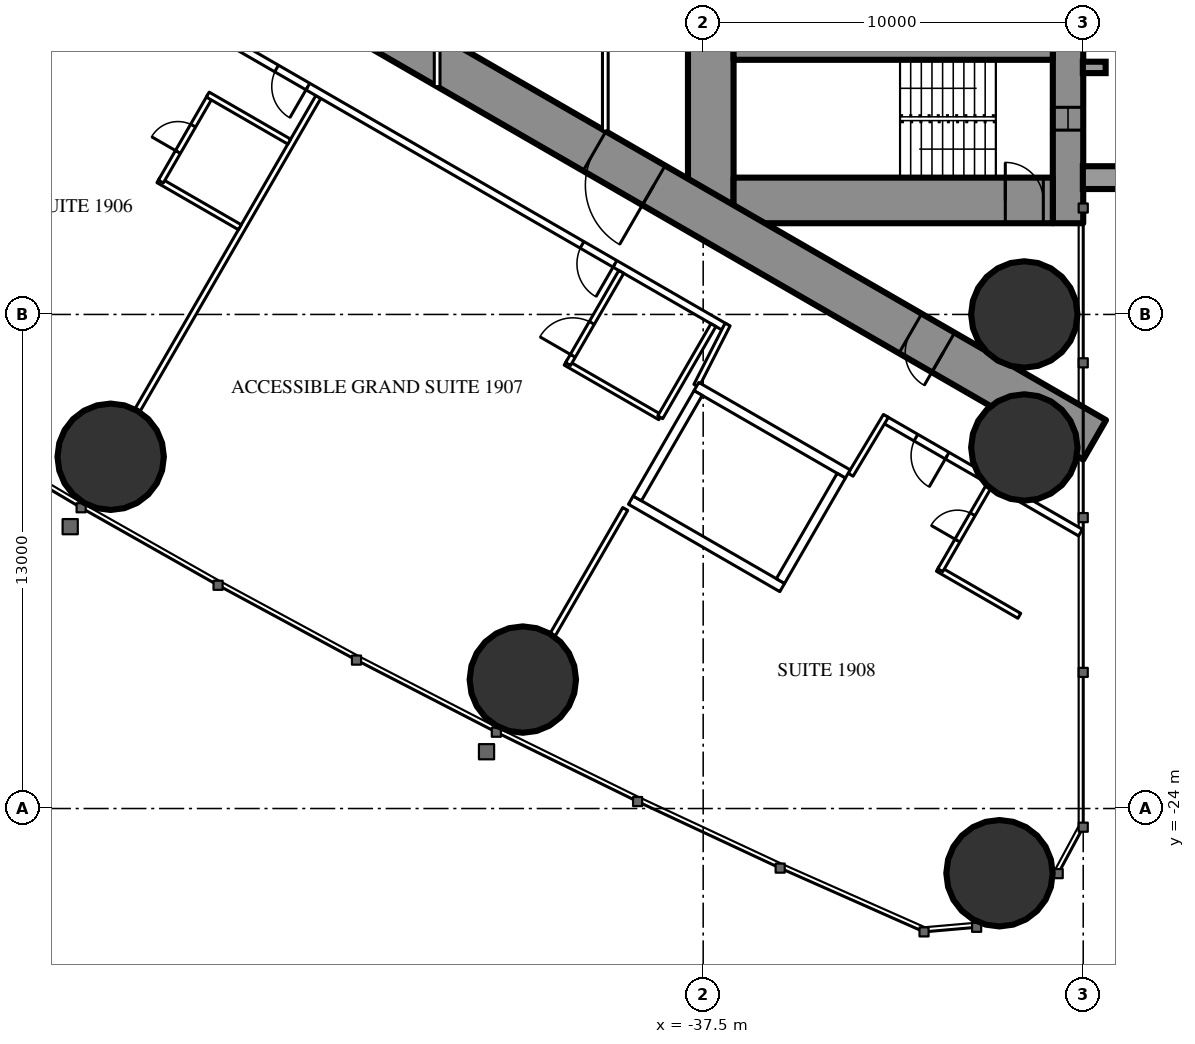
"""IFC4 building model, lengths in metres.
Left out: names, types, materials, properties, quantities, classifications, styles, units other than length and angle.
Written with IfcOpenShell. Run it as: python <this file> out.ifc"""

import sys

from ifc_helpers import new_model, si_unit, direction, frame, frame_2d, origin, origin_2d, place, context, subcontext, project, spatial, rectangle, hollow_circle, extrude, element, fill, save


model = new_model("IFC4")
c1 = context("Model", 3, precision=1e-05, world=origin(), true_north=direction((0.0, 1.0)))
c2 = subcontext(c1, "Body", "Model", "MODEL_VIEW")
j1 = project(units=[si_unit("LENGTHUNIT", "METRE"), si_unit("PLANEANGLEUNIT", "RADIAN")], contexts=[c1])
p1 = place(None, origin())
s1 = spatial("IfcSite", under=j1, at=p1, CompositionType="ELEMENT")
p2 = place(p1, origin())
s2 = spatial("IfcBuilding", under=s1, at=p2, CompositionType="ELEMENT")
p3 = place(p2, frame((0.0, 0.0, 74.0)))
s3 = spatial("IfcBuildingStorey", under=s2, at=p3, CompositionType="ELEMENT", Elevation=74.0)
for number, where, z_axis, x_axis in (
    (1, (-29.703, -25.703, 0.0), (0.0, 0.0, 1.0), (1.0, 0.0, 0.0)),
    (2, (-29.05, -11.0, 0.0), (0.0, 0.0, 1.0), (1.0, 0.0, 0.0)),
    (3, (-29.05, -14.5, 0.0), (0.0, 0.0, 1.0), (1.0, 0.0, 0.0)),
    (4, (-53.09, -14.745, 0.0), (0.0, 0.0, 1.0), (1.0, 0.0, 0.0)),
    (5, (-42.245, -20.607, 0.0), (0.0, 0.0, 1.0), (1.0, 0.0, 0.0)),
):
    element("IfcColumn", number, at=place(p3, frame(where, z_axis=z_axis, x_axis=x_axis)), inside=s3, PredefinedType="COLUMN", context=c2, shape_type="SweptSolid", body=[
        extrude(hollow_circle(Radius=1.4, WallThickness=0.12, at=origin_2d()), origin(), (0.0, 0.0, 1.0), 3.5),
    ])
p4 = place(p3, frame((-27.9, 8.6, 0.0), z_axis=(0.0, 0.0, 1.0), x_axis=(0.0, -1.0, 0.0)))
e6 = element("IfcWall", 6, at=p4, inside=s3, PredefinedType="SHEAR", context=c2, shape_type="SweptSolid", body=[
    extrude(rectangle(XDim=17.2, YDim=0.8, at=frame_2d((8.6, 0.0))), origin(), (0.0, 0.0, 1.0), 3.5),
])
p5 = place(p4, frame((2.45, 0.0, 0.6)))
e7 = element("IfcOpeningElement", 7, at=p5, cuts=e6, PredefinedType="OPENING", context=c2, shape_type="SweptSolid", body=[
    extrude(rectangle(XDim=0.6, YDim=2.1, at=frame_2d((0.3, 1.05))), frame((0.0, 0.41, 0.0), z_axis=(0.0, -1.0, 0.0), x_axis=(1.0, 0.0, 0.0)), (0.0, 0.0, 1.0), 0.82),
])
p6 = place(p4, frame((14.15, 0.0, 0.6)))
e8 = element("IfcOpeningElement", 8, at=p6, cuts=e6, PredefinedType="OPENING", context=c2, shape_type="SweptSolid", body=[
    extrude(rectangle(XDim=0.6, YDim=2.1, at=frame_2d((0.3, 1.05))), frame((0.0, 0.41, 0.0), z_axis=(0.0, -1.0, 0.0), x_axis=(1.0, 0.0, 0.0)), (0.0, 0.0, 1.0), 0.82),
])
p7 = place(p3, frame((-37.3, 8.6, 0.0), z_axis=(0.0, 0.0, 1.0), x_axis=(0.0, -1.0, 0.0)))
e9 = element("IfcWall", 9, at=p7, inside=s3, PredefinedType="SHEAR", context=c2, shape_type="SweptSolid", body=[
    extrude(rectangle(XDim=17.2, YDim=1.2, at=frame_2d((8.6, 0.0))), origin(), (0.0, 0.0, 1.0), 3.5),
])
p8 = place(p7, frame((7.7, 0.0, 0.0)))
e10 = element("IfcOpeningElement", 10, at=p8, cuts=e9, PredefinedType="OPENING", context=c2, shape_type="SweptSolid", body=[
    extrude(rectangle(XDim=1.8, YDim=2.2, at=frame_2d((0.9, 1.1))), frame((0.0, 0.61, 0.0), z_axis=(0.0, -1.0, 0.0), x_axis=(1.0, 0.0, 0.0)), (0.0, 0.0, 1.0), 1.22),
])
p9 = place(p3, frame((-28.3, -8.0, 0.0), z_axis=(0.0, 0.0, 1.0), x_axis=(-1.0, 0.0, 0.0)))
e11 = element("IfcWall", 11, at=p9, inside=s3, PredefinedType="SHEAR", context=c2, shape_type="SweptSolid", body=[
    extrude(rectangle(XDim=8.4, YDim=1.2, at=frame_2d((4.2, 0.0))), origin(), (0.0, 0.0, 1.0), 3.5),
])
p10 = place(p9, frame((0.25, 0.0, 0.0)))
e12 = element("IfcOpeningElement", 12, at=p10, cuts=e11, PredefinedType="OPENING", context=c2, shape_type="SweptSolid", body=[
    extrude(rectangle(XDim=1.0, YDim=2.2, at=frame_2d((0.5, 1.1))), frame((0.0, 0.61, 0.0), z_axis=(0.0, -1.0, 0.0), x_axis=(1.0, 0.0, 0.0)), (0.0, 0.0, 1.0), 1.22),
])
p11 = place(p3, frame((-28.3, -4.15, 0.0), z_axis=(0.0, 0.0, 1.0), x_axis=(-1.0, 0.0, 0.0)))
e13 = element("IfcWall", 13, at=p11, inside=s3, PredefinedType="SHEAR", context=c2, shape_type="SweptSolid", body=[
    extrude(rectangle(XDim=8.4, YDim=0.3, at=frame_2d((4.2, 0.0))), origin(), (0.0, 0.0, 1.0), 3.5),
])
p12 = place(p3, frame((-27.2, -14.3, 0.0), z_axis=(0.0, 0.0, 1.0), x_axis=(-0.866024021859, 0.500002393557, 0.0)))
e14 = element("IfcWall", 14, at=p12, inside=s3, PredefinedType="SHEAR", context=c2, shape_type="SweptSolid", body=[
    extrude(rectangle(XDim=27.907, YDim=1.2, at=frame_2d((13.954, 0.0))), origin(), (0.0, 0.0, 1.0), 3.5),
])
p13 = place(p12, frame((4.6, 0.0, 0.0)))
e15 = element("IfcOpeningElement", 15, at=p13, cuts=e14, PredefinedType="OPENING", context=c2, shape_type="SweptSolid", body=[
    extrude(rectangle(XDim=1.0, YDim=2.2, at=frame_2d((0.5, 1.1))), frame((0.0, 0.61, 0.0), z_axis=(0.0, -1.0, 0.0), x_axis=(1.0, 0.0, 0.0)), (0.0, 0.0, 1.0), 1.22),
])
p14 = place(p12, frame((13.395, 0.0, 0.0)))
e16 = element("IfcOpeningElement", 16, at=p14, cuts=e14, PredefinedType="OPENING", context=c2, shape_type="SweptSolid", body=[
    extrude(rectangle(XDim=1.8, YDim=2.2, at=frame_2d((0.9, 1.1))), frame((0.0, 0.61, 0.0), z_axis=(0.0, -1.0, 0.0), x_axis=(1.0, 0.0, 0.0)), (0.0, 0.0, 1.0), 1.22),
])
p15 = place(p3, frame((-47.627, -5.278, 0.0), z_axis=(0.0, 0.0, 1.0), x_axis=(-0.500009844318, -0.86601972009, 0.0)))
e17 = element("IfcWall", 17, at=p15, inside=s3, PredefinedType="PARTITIONING", context=c2, shape_type="SweptSolid", body=[
    extrude(rectangle(XDim=9.51, YDim=0.15, at=frame_2d((4.755, 0.0))), origin(), (0.0, 0.0, 1.0), 2.25),
])
p16 = place(p3, frame((-39.551, -16.118, 0.0), z_axis=(0.0, 0.0, 1.0), x_axis=(-0.499986503906, -0.866033195618, 0.0)))
e18 = element("IfcWall", 18, at=p16, inside=s3, PredefinedType="PARTITIONING", context=c2, shape_type="SweptSolid", body=[
    extrude(rectangle(XDim=3.815, YDim=0.15, at=frame_2d((1.907, 0.0))), origin(), (0.0, 0.0, 1.0), 3.25),
])
p17 = place(p3, frame((-27.572, -16.741, 0.0), z_axis=(0.0, 0.0, 1.0), x_axis=(-0.866024464444, 0.500001626982, 0.0)))
e19 = element("IfcWall", 19, at=p17, inside=s3, PredefinedType="PARTITIONING", context=c2, shape_type="SweptSolid", body=[
    extrude(rectangle(XDim=5.955, YDim=0.2, at=frame_2d((2.978, 0.0))), origin(), (0.0, 0.0, 1.0), 3.25),
])
p18 = place(p17, frame((4.05, 0.0, 0.0)))
e20 = element("IfcOpeningElement", 20, at=p18, cuts=e19, PredefinedType="OPENING", context=c2, shape_type="SweptSolid", body=[
    extrude(rectangle(XDim=0.95, YDim=2.2, at=frame_2d((0.475, 1.1))), frame((0.0, 0.11, 0.0), z_axis=(0.0, -1.0, 0.0), x_axis=(1.0, 0.0, 0.0)), (0.0, 0.0, 1.0), 0.22),
])
p19 = place(p3, frame((-36.92, -11.344, 0.0), z_axis=(0.0, 0.0, 1.0), x_axis=(-0.866028313256, 0.499994960614, 0.0)))
e21 = element("IfcWall", 21, at=p19, inside=s3, PredefinedType="PARTITIONING", context=c2, shape_type="SweptSolid", body=[
    extrude(rectangle(XDim=22.568, YDim=0.2, at=frame_2d((11.284, 0.0))), origin(), (0.0, 0.0, 1.0), 3.25),
])
p20 = place(p19, frame((20.958, 0.0, 0.0)))
e22 = element("IfcOpeningElement", 22, at=p20, cuts=e21, PredefinedType="OPENING", context=c2, shape_type="SweptSolid", body=[
    extrude(rectangle(XDim=0.95, YDim=2.2, at=frame_2d((0.475, 1.1))), frame((0.0, 0.11, 0.0), z_axis=(0.0, -1.0, 0.0), x_axis=(1.0, 0.0, 0.0)), (0.0, 0.0, 1.0), 0.22),
])
p21 = place(p19, frame((12.68, 0.0, 0.0)))
e23 = element("IfcOpeningElement", 23, at=p21, cuts=e21, PredefinedType="OPENING", context=c2, shape_type="SweptSolid", body=[
    extrude(rectangle(XDim=0.95, YDim=2.2, at=frame_2d((0.475, 1.1))), frame((0.0, 0.11, 0.0), z_axis=(0.0, -1.0, 0.0), x_axis=(1.0, 0.0, 0.0)), (0.0, 0.0, 1.0), 0.22),
])
p22 = place(p19, frame((3.35, 0.0, 0.0)))
e24 = element("IfcOpeningElement", 24, at=p22, cuts=e21, PredefinedType="OPENING", context=c2, shape_type="SweptSolid", body=[
    extrude(rectangle(XDim=1.0, YDim=2.2, at=frame_2d((0.5, 1.1))), frame((0.0, 0.11, 0.0), z_axis=(0.0, -1.0, 0.0), x_axis=(1.0, 0.0, 0.0)), (0.0, 0.0, 1.0), 0.22),
])
p23 = place(p3, frame((-36.857, -11.265, 0.0), z_axis=(0.0, 0.0, 1.0), x_axis=(-0.454225294761, -0.890886851176, 0.0)))
e25 = element("IfcWall", 25, at=p23, inside=s3, PredefinedType="PARTITIONING", context=c2, shape_type="SweptSolid", body=[
    extrude(rectangle(XDim=1.807, YDim=0.15, at=frame_2d((0.904, 0.0))), origin(), (0.0, 0.0, 1.0), 3.25),
])
p24 = place(p3, frame((-33.621, -15.218, 0.0), z_axis=(0.0, 0.0, 1.0), x_axis=(0.514336634837, 0.857588377991, 0.0)))
e26 = element("IfcWall", 26, at=p24, inside=s3, PredefinedType="PARTITIONING", context=c2, shape_type="SweptSolid", body=[
    extrude(rectangle(XDim=1.805, YDim=0.15, at=frame_2d((0.903, 0.0))), origin(), (0.0, 0.0, 1.0), 3.25),
])
p25 = place(p3, frame((-49.692, -8.704, 0.0), z_axis=(0.0, 0.0, 1.0), x_axis=(-0.866073894602, 0.499916002032, 0.0)))
e27 = element("IfcWall", 27, at=p25, inside=s3, PredefinedType="PARTITIONING", context=c2, shape_type="SweptSolid", body=[
    extrude(rectangle(XDim=2.475, YDim=0.15, at=frame_2d((1.238, 0.0))), origin(), (0.0, 0.0, 1.0), 3.25),
])
p26 = place(p3, frame((-50.47, -5.253, 0.0), z_axis=(0.0, 0.0, 1.0), x_axis=(-0.500006934395, -0.866021400173, 0.0)))
e28 = element("IfcWall", 28, at=p26, inside=s3, PredefinedType="PARTITIONING", context=c2, shape_type="SweptSolid", body=[
    extrude(rectangle(XDim=2.6, YDim=0.15, at=frame_2d((1.3, 0.0))), origin(), (0.0, 0.0, 1.0), 3.25),
])
p27 = place(p26, frame((0.9, 0.0, 0.0)))
e29 = element("IfcOpeningElement", 29, at=p27, cuts=e28, PredefinedType="OPENING", context=c2, shape_type="SweptSolid", body=[
    extrude(rectangle(XDim=0.8, YDim=2.2, at=frame_2d((0.4, 1.1))), frame((0.0, 0.085, 0.0), z_axis=(0.0, -1.0, 0.0), x_axis=(1.0, 0.0, 0.0)), (0.0, 0.0, 1.0), 0.17),
])
p28 = place(p3, frame((-48.392, -6.453, 0.0), z_axis=(0.0, 0.0, 1.0), x_axis=(-0.86604923931, 0.499958713387, 0.0)))
e30 = element("IfcWall", 30, at=p28, inside=s3, PredefinedType="PARTITIONING", context=c2, shape_type="SweptSolid", body=[
    extrude(rectangle(XDim=2.475, YDim=0.15, at=frame_2d((1.237, 0.0))), origin(), (0.0, 0.0, 1.0), 3.25),
])
p29 = place(p3, frame((-38.63, -13.705, 0.0), z_axis=(0.0, 0.0, 1.0), x_axis=(-0.866018712932, 0.500011588718, 0.0)))
e31 = element("IfcWall", 31, at=p29, inside=s3, PredefinedType="PARTITIONING", context=c2, shape_type="SweptSolid", body=[
    extrude(rectangle(XDim=2.875, YDim=0.15, at=frame_2d((1.438, 0.0))), origin(), (0.0, 0.0, 1.0), 3.25),
])
p30 = place(p3, frame((-39.655, -9.88, 0.0), z_axis=(0.0, 0.0, 1.0), x_axis=(-0.500049511043, -0.865996816683, 0.0)))
e32 = element("IfcWall", 32, at=p30, inside=s3, PredefinedType="PARTITIONING", context=c2, shape_type="SweptSolid", body=[
    extrude(rectangle(XDim=2.8, YDim=0.15, at=frame_2d((1.4, 0.0))), origin(), (0.0, 0.0, 1.0), 3.25),
])
p31 = place(p30, frame((1.55, 0.0, 0.0)))
e33 = element("IfcOpeningElement", 33, at=p31, cuts=e32, PredefinedType="OPENING", context=c2, shape_type="SweptSolid", body=[
    extrude(rectangle(XDim=1.0, YDim=2.2, at=frame_2d((0.5, 1.1))), frame((0.0, 0.085, 0.0), z_axis=(0.0, -1.0, 0.0), x_axis=(1.0, 0.0, 0.0)), (0.0, 0.0, 1.0), 0.17),
])
p32 = place(p3, frame((-37.23, -11.281, 0.0), z_axis=(0.0, 0.0, 1.0), x_axis=(-0.500049511043, -0.865996816683, 0.0)))
e34 = element("IfcWall", 34, at=p32, inside=s3, PredefinedType="PARTITIONING", context=c2, shape_type="SweptSolid", body=[
    extrude(rectangle(XDim=2.8, YDim=0.15, at=frame_2d((1.4, 0.0))), origin(), (0.0, 0.0, 1.0), 3.25),
])
p33 = place(p3, frame((-29.182, -18.929, 0.0), z_axis=(0.0, 0.0, 1.0), x_axis=(-0.866006523861, 0.500032699561, 0.0)))
e35 = element("IfcWall", 35, at=p33, inside=s3, PredefinedType="PARTITIONING", context=c2, shape_type="SweptSolid", body=[
    extrude(rectangle(XDim=2.475, YDim=0.15, at=frame_2d((1.237, 0.0))), origin(), (0.0, 0.0, 1.0), 3.25),
])
p34 = place(p3, frame((-29.96, -15.478, 0.0), z_axis=(0.0, 0.0, 1.0), x_axis=(-0.500006934395, -0.866021400173, 0.0)))
e36 = element("IfcWall", 36, at=p34, inside=s3, PredefinedType="PARTITIONING", context=c2, shape_type="SweptSolid", body=[
    extrude(rectangle(XDim=2.6, YDim=0.15, at=frame_2d((1.3, 0.0))), origin(), (0.0, 0.0, 1.0), 3.25),
])
p35 = place(p34, frame((0.9, 0.0, 0.0)))
e37 = element("IfcOpeningElement", 37, at=p35, cuts=e36, PredefinedType="OPENING", context=c2, shape_type="SweptSolid", body=[
    extrude(rectangle(XDim=0.8, YDim=2.2, at=frame_2d((0.4, 1.1))), frame((0.0, 0.085, 0.0), z_axis=(0.0, -1.0, 0.0), x_axis=(1.0, 0.0, 0.0)), (0.0, 0.0, 1.0), 0.17),
])
p36 = place(p3, frame((-40.075, 1.2, 0.0), z_axis=(0.0, 0.0, 1.0), x_axis=(0.0, -1.0, 0.0)))
e38 = element("IfcWall", 38, at=p36, inside=s3, PredefinedType="PARTITIONING", context=c2, shape_type="SweptSolid", body=[
    extrude(rectangle(XDim=7.374, YDim=0.15, at=frame_2d((3.687, 0.0))), origin(), (0.0, 0.0, 1.0), 3.25),
])
p37 = place(p36, frame((2.787, 0.0, 0.0)))
e39 = element("IfcOpeningElement", 39, at=p37, cuts=e38, PredefinedType="OPENING", context=c2, shape_type="SweptSolid", body=[
    extrude(rectangle(XDim=1.8, YDim=2.2, at=frame_2d((0.9, 1.1))), frame((0.0, 0.085, 0.0), z_axis=(0.0, -1.0, 0.0), x_axis=(1.0, 0.0, 0.0)), (0.0, 0.0, 1.0), 0.17),
])
p38 = place(p3, frame((-44.5, 5.005, 0.0), z_axis=(0.0, 0.0, 1.0), x_axis=(0.0, -1.0, 0.0)))
e40 = element("IfcWall", 40, at=p38, inside=s3, PredefinedType="PARTITIONING", context=c2, shape_type="SweptSolid", body=[
    extrude(rectangle(XDim=10.009, YDim=0.15, at=frame_2d((5.005, 0.0))), origin(), (0.0, 0.0, 1.0), 2.45),
])
p39 = place(p38, frame((2.002, 0.0, 0.0)))
e41 = element("IfcOpeningElement", 41, at=p39, cuts=e40, PredefinedType="OPENING", context=c2, shape_type="SweptSolid", body=[
    extrude(rectangle(XDim=1.0, YDim=2.2, at=frame_2d((0.5, 1.1))), frame((0.0, 0.085, 0.0), z_axis=(0.0, -1.0, 0.0), x_axis=(1.0, 0.0, 0.0)), (0.0, 0.0, 1.0), 0.17),
])
p40 = place(p38, frame((7.007, 0.0, 0.0)))
e42 = element("IfcOpeningElement", 42, at=p40, cuts=e40, PredefinedType="OPENING", context=c2, shape_type="SweptSolid", body=[
    extrude(rectangle(XDim=1.0, YDim=2.2, at=frame_2d((0.5, 1.1))), frame((0.0, 0.085, 0.0), z_axis=(0.0, -1.0, 0.0), x_axis=(1.0, 0.0, 0.0)), (0.0, 0.0, 1.0), 0.17),
])
p41 = place(p3, frame((-33.696, -15.197, 0.0), z_axis=(0.0, 0.0, 1.0), x_axis=(-0.865976953817, 0.500083908417, 0.0)))
e43 = element("IfcWall", 43, at=p41, inside=s3, PredefinedType="PARTITIONING", context=c2, shape_type="SweptSolid", body=[
    extrude(rectangle(XDim=4.599, YDim=0.25, at=frame_2d((2.3, 0.0))), origin(), (0.0, 0.0, 1.0), 3.25),
])
p42 = place(p3, frame((-35.42, -18.186, 0.0), z_axis=(0.0, 0.0, 1.0), x_axis=(-0.865990227814, 0.50006092162, 0.0)))
e44 = element("IfcWall", 44, at=p42, inside=s3, PredefinedType="PARTITIONING", context=c2, shape_type="SweptSolid", body=[
    extrude(rectangle(XDim=4.6, YDim=0.25, at=frame_2d((2.3, 0.0))), origin(), (0.0, 0.0, 1.0), 3.25),
])
p43 = place(p3, frame((-33.866, -15.243, 0.0), z_axis=(0.0, 0.0, 1.0), x_axis=(-0.499929347863, -0.866066190972, 0.0)))
e45 = element("IfcWall", 45, at=p43, inside=s3, PredefinedType="PARTITIONING", context=c2, shape_type="SweptSolid", body=[
    extrude(rectangle(XDim=3.201, YDim=0.25, at=frame_2d((1.6, 0.0))), origin(), (0.0, 0.0, 1.0), 3.25),
])
p44 = place(p3, frame((-37.633, -13.068, 0.0), z_axis=(0.0, 0.0, 1.0), x_axis=(-0.499872130319, -0.866099216793, 0.0)))
e46 = element("IfcWall", 46, at=p44, inside=s3, PredefinedType="PARTITIONING", context=c2, shape_type="SweptSolid", body=[
    extrude(rectangle(XDim=3.2, YDim=0.25, at=frame_2d((1.6, 0.0))), origin(), (0.0, 0.0, 1.0), 3.25),
])
p45 = place(p27, origin())
e47 = element("IfcDoor", 47, at=p45, inside=s3, OperationType="SINGLE_SWING_RIGHT", PredefinedType="DOOR", context=c2, shape_type="SweptSolid", body=[
    extrude(rectangle(XDim=0.8, YDim=2.2, at=frame_2d((0.4, 1.1))), frame((0.0, 0.025, 0.0), z_axis=(0.0, -1.0, 0.0), x_axis=(1.0, 0.0, 0.0)), (0.0, 0.0, 1.0), 0.05),
])
fill(e29, e47)
p46 = place(p21, origin())
e48 = element("IfcDoor", 48, at=p46, inside=s3, OperationType="SINGLE_SWING_LEFT", PredefinedType="DOOR", context=c2, shape_type="SweptSolid", body=[
    extrude(rectangle(XDim=0.95, YDim=2.2, at=frame_2d((0.475, 1.1))), frame((0.0, 0.025, 0.0), z_axis=(0.0, -1.0, 0.0), x_axis=(1.0, 0.0, 0.0)), (0.0, 0.0, 1.0), 0.05),
])
fill(e23, e48)
p47 = place(p31, origin())
e49 = element("IfcDoor", 49, at=p47, inside=s3, OperationType="SINGLE_SWING_RIGHT", PredefinedType="DOOR", context=c2, shape_type="SweptSolid", body=[
    extrude(rectangle(XDim=1.0, YDim=2.2, at=frame_2d((0.5, 1.1))), frame((0.0, 0.025, 0.0), z_axis=(0.0, -1.0, 0.0), x_axis=(1.0, 0.0, 0.0)), (0.0, 0.0, 1.0), 0.05),
])
fill(e33, e49)
p48 = place(p22, origin())
e50 = element("IfcDoor", 50, at=p48, inside=s3, OperationType="SINGLE_SWING_LEFT", PredefinedType="DOOR", context=c2, shape_type="SweptSolid", body=[
    extrude(rectangle(XDim=1.0, YDim=2.2, at=frame_2d((0.5, 1.1))), frame((0.0, 0.025, 0.0), z_axis=(0.0, -1.0, 0.0), x_axis=(1.0, 0.0, 0.0)), (0.0, 0.0, 1.0), 0.05),
])
fill(e24, e50)
p49 = place(p35, origin())
e51 = element("IfcDoor", 51, at=p49, inside=s3, OperationType="SINGLE_SWING_RIGHT", PredefinedType="DOOR", context=c2, shape_type="SweptSolid", body=[
    extrude(rectangle(XDim=0.8, YDim=2.2, at=frame_2d((0.4, 1.1))), frame((0.0, 0.025, 0.0), z_axis=(0.0, -1.0, 0.0), x_axis=(1.0, 0.0, 0.0)), (0.0, 0.0, 1.0), 0.05),
])
fill(e37, e51)
p50 = place(p18, origin())
e52 = element("IfcDoor", 52, at=p50, inside=s3, OperationType="SINGLE_SWING_LEFT", PredefinedType="DOOR", context=c2, shape_type="SweptSolid", body=[
    extrude(rectangle(XDim=0.95, YDim=2.2, at=frame_2d((0.475, 1.1))), frame((0.0, 0.025, 0.0), z_axis=(0.0, -1.0, 0.0), x_axis=(1.0, 0.0, 0.0)), (0.0, 0.0, 1.0), 0.05),
])
fill(e20, e52)
p51 = place(p13, origin())
e53 = element("IfcDoor", 53, at=p51, inside=s3, OperationType="SINGLE_SWING_LEFT", PredefinedType="DOOR", context=c2, shape_type="SweptSolid", body=[
    extrude(rectangle(XDim=1.0, YDim=2.2, at=frame_2d((0.5, 1.1))), frame((0.0, 0.025, 0.0), z_axis=(0.0, -1.0, 0.0), x_axis=(1.0, 0.0, 0.0)), (0.0, 0.0, 1.0), 0.05),
])
fill(e15, e53)
p52 = place(p14, origin())
e54 = element("IfcDoor", 54, at=p52, inside=s3, OperationType="DOUBLE_DOOR_SINGLE_SWING", PredefinedType="DOOR", context=c2, shape_type="SweptSolid", body=[
    extrude(rectangle(XDim=1.8, YDim=2.2, at=frame_2d((0.9, 1.1))), frame((0.0, 0.025, 0.0), z_axis=(0.0, -1.0, 0.0), x_axis=(1.0, 0.0, 0.0)), (0.0, 0.0, 1.0), 0.05),
])
fill(e16, e54)
p53 = place(p10, origin())
e55 = element("IfcDoor", 55, at=p53, inside=s3, OperationType="SINGLE_SWING_RIGHT", PredefinedType="DOOR", context=c2, shape_type="SweptSolid", body=[
    extrude(rectangle(XDim=1.0, YDim=2.2, at=frame_2d((0.5, 1.1))), frame((0.0, 0.025, 0.0), z_axis=(0.0, -1.0, 0.0), x_axis=(1.0, 0.0, 0.0)), (0.0, 0.0, 1.0), 0.05),
])
fill(e12, e55)
p54 = place(p6, origin())
e56 = element("IfcWindow", 56, at=p54, inside=s3, PartitioningType="SINGLE_PANEL", PredefinedType="WINDOW", context=c2, shape_type="SweptSolid", body=[
    extrude(rectangle(XDim=0.6, YDim=2.1, at=frame_2d((0.3, 1.05))), frame((0.0, 0.03, 0.0), z_axis=(0.0, -1.0, 0.0), x_axis=(1.0, 0.0, 0.0)), (0.0, 0.0, 1.0), 0.06),
])
fill(e8, e56)
save(model, sys.argv[1])
